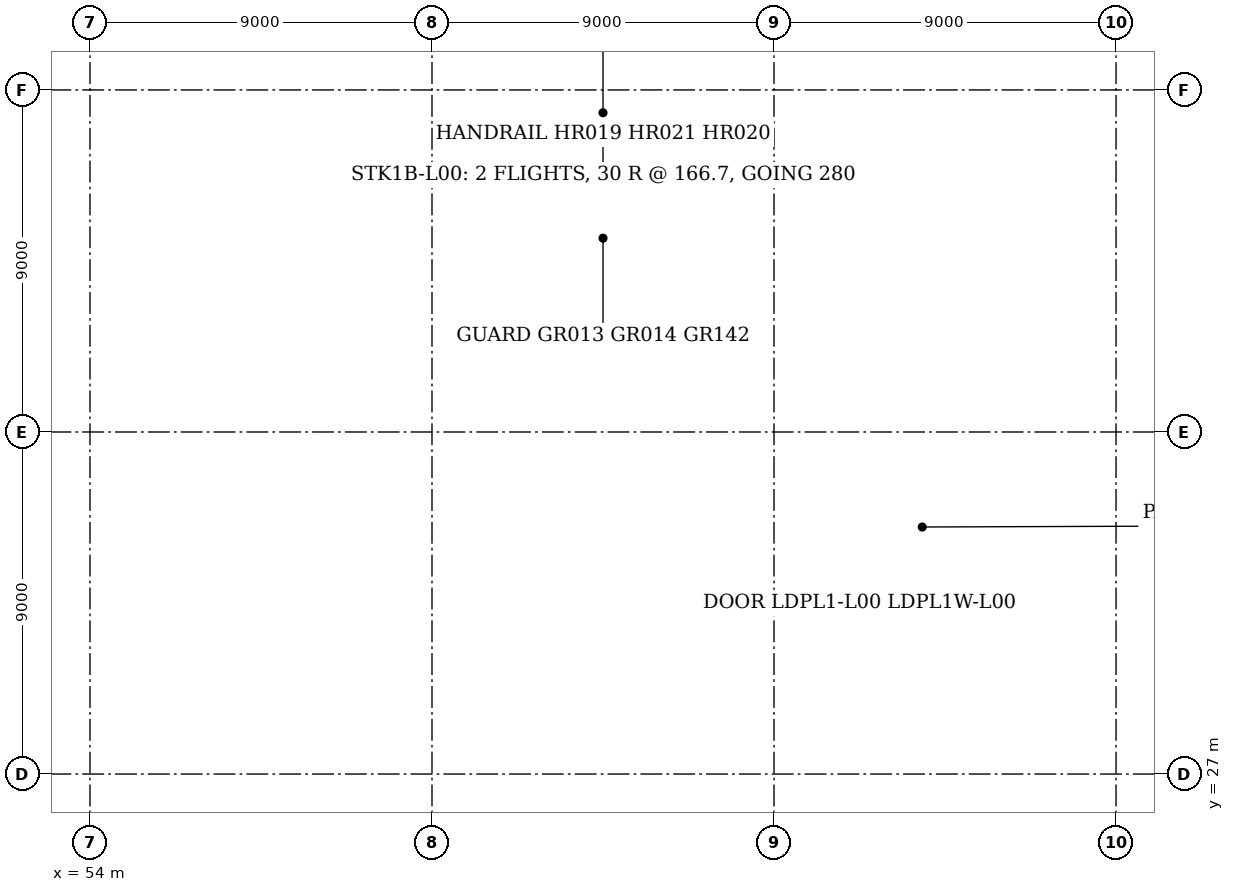
"""IFC4 building model, lengths in metres.
Left out: names, types, materials, properties, quantities, classifications, styles, units other than length and angle.
Written with IfcOpenShell. Run it as: python <this file> out.ifc"""

import sys

from ifc_helpers import new_model, si_unit, direction, frame, frame_2d, origin, origin_2d, place, context, subcontext, project, spatial, rectangle, hollow_circle, i_section, extrude, element, fill, save


model = new_model("IFC4")
c1 = context("Model", 3, precision=1e-05, world=origin(), true_north=direction((0.0, 1.0)))
c2 = subcontext(c1, "Body", "Model", "MODEL_VIEW")
j1 = project(units=[si_unit("LENGTHUNIT", "METRE"), si_unit("PLANEANGLEUNIT", "RADIAN")], contexts=[c1])
p1 = place(None, origin())
s1 = spatial("IfcSite", under=j1, at=p1, CompositionType="ELEMENT")
p2 = place(p1, origin())
s2 = spatial("IfcBuilding", under=s1, at=p2, CompositionType="ELEMENT")
p3 = place(p2, origin())
s3 = spatial("IfcBuildingStorey", under=s2, at=p3, CompositionType="ELEMENT", Elevation=0.0)
p4 = place(p3, frame((54.0, 27.0, 0.0), z_axis=(0.0, 0.0, 1.0), x_axis=(1.0, 0.0, 0.0)))
e1 = element("IfcColumn", 1, at=p4, inside=s3, PredefinedType="COLUMN", context=c2, shape_type="SweptSolid", body=[
    extrude(i_section(OverallWidth=0.5, OverallDepth=0.48, WebThickness=0.04, FlangeThickness=0.04, at=origin_2d()), origin(), (0.0, 0.0, 1.0), 5.0),
])
p5 = place(p3, frame((63.0, 27.0, 0.0), z_axis=(0.0, 0.0, 1.0), x_axis=(1.0, 0.0, 0.0)))
e2 = element("IfcColumn", 2, at=p5, inside=s3, PredefinedType="COLUMN", context=c2, shape_type="SweptSolid", body=[
    extrude(i_section(OverallWidth=0.311, OverallDepth=0.327, WebThickness=0.016, FlangeThickness=0.025, FilletRadius=0.017, at=origin_2d()), origin(), (0.0, 0.0, 1.0), 5.0),
])
p6 = place(p3, frame((81.0, 27.0, 0.0), z_axis=(0.0, 0.0, 1.0), x_axis=(1.0, 0.0, 0.0)))
e3 = element("IfcColumn", 3, at=p6, inside=s3, PredefinedType="COLUMN", context=c2, shape_type="SweptSolid", body=[
    extrude(hollow_circle(Radius=0.203, WallThickness=0.013, at=origin_2d()), origin(), (0.0, 0.0, 1.0), 5.0),
])
p7 = place(p3, frame((54.0, 36.0, 0.0), z_axis=(0.0, 0.0, 1.0), x_axis=(1.0, 0.0, 0.0)))
e4 = element("IfcColumn", 4, at=p7, inside=s3, PredefinedType="COLUMN", context=c2, shape_type="SweptSolid", body=[
    extrude(i_section(OverallWidth=0.5, OverallDepth=0.48, WebThickness=0.04, FlangeThickness=0.04, at=origin_2d()), origin(), (0.0, 0.0, 1.0), 5.0),
])
p8 = place(p3, frame((63.0, 36.0, 0.0), z_axis=(0.0, 0.0, 1.0), x_axis=(1.0, 0.0, 0.0)))
e5 = element("IfcColumn", 5, at=p8, inside=s3, PredefinedType="COLUMN", context=c2, shape_type="SweptSolid", body=[
    extrude(i_section(OverallWidth=0.311, OverallDepth=0.327, WebThickness=0.016, FlangeThickness=0.025, FilletRadius=0.017, at=origin_2d()), origin(), (0.0, 0.0, 1.0), 5.0),
])
p9 = place(p3, frame((81.0, 36.0, 0.0), z_axis=(0.0, 0.0, 1.0), x_axis=(1.0, 0.0, 0.0)))
e6 = element("IfcColumn", 6, at=p9, inside=s3, PredefinedType="COLUMN", context=c2, shape_type="SweptSolid", body=[
    extrude(i_section(OverallWidth=0.35, OverallDepth=0.339, WebThickness=0.025, FlangeThickness=0.032, at=origin_2d()), origin(), (0.0, 0.0, 1.0), 5.0),
])
p10 = place(p3, frame((54.0, 45.0, 0.0), z_axis=(0.0, 0.0, 1.0), x_axis=(1.0, 0.0, 0.0)))
e7 = element("IfcColumn", 7, at=p10, inside=s3, PredefinedType="COLUMN", context=c2, shape_type="SweptSolid", body=[
    extrude(i_section(OverallWidth=0.5, OverallDepth=0.48, WebThickness=0.04, FlangeThickness=0.04, at=origin_2d()), origin(), (0.0, 0.0, 1.0), 5.0),
])
p11 = place(p3, frame((54.25, 44.91, 0.0), z_axis=(0.0, 0.0, 1.0), x_axis=(1.0, 0.0, 0.0)))
e8 = element("IfcWall", 8, at=p11, inside=s3, PredefinedType="SOLIDWALL", context=c2, shape_type="SweptSolid", body=[
    extrude(rectangle(XDim=8.75, YDim=0.3, at=frame_2d((4.375, 0.0))), origin(), (0.0, 0.0, 1.0), 4.378),
])
p12 = place(p3, frame((63.125, 45.2, -0.7), z_axis=(0.0, 0.0, 1.0), x_axis=(0.0, 1.0, 0.0)))
e9 = element("IfcWall", 9, at=p12, inside=s3, PredefinedType="SOLIDWALL", context=c2, shape_type="SweptSolid", body=[
    extrude(rectangle(XDim=5.55, YDim=0.25, at=frame_2d((2.775, 0.0))), origin(), (0.0, 0.0, 1.0), 0.7),
])
p13 = place(p3, frame((63.0, 40.65, 0.0), z_axis=(0.0, 0.0, 1.0), x_axis=(1.0, 0.0, 0.0)))
e10 = element("IfcWall", 10, at=p13, inside=s3, PredefinedType="SOLIDWALL", context=c2, shape_type="SweptSolid", body=[
    extrude(rectangle(XDim=9.0, YDim=0.3, at=frame_2d((4.5, 0.0))), origin(), (0.0, 0.0, 1.0), 5.0),
])
p14 = place(p13, frame((0.55, 0.0, 0.0)))
e11 = element("IfcOpeningElement", 11, at=p14, cuts=e10, PredefinedType="OPENING", context=c2, shape_type="SweptSolid", body=[
    extrude(rectangle(XDim=1.2, YDim=2.1, at=frame_2d((0.6, 1.05))), frame((0.0, 0.16, 0.0), z_axis=(0.0, -1.0, 0.0), x_axis=(1.0, 0.0, 0.0)), (0.0, 0.0, 1.0), 0.32),
])
p15 = place(p3, frame((71.85, 40.8, 0.0), z_axis=(0.0, 0.0, 1.0), x_axis=(0.0, 1.0, 0.0)))
e12 = element("IfcWall", 12, at=p15, inside=s3, PredefinedType="SOLIDWALL", context=c2, shape_type="SweptSolid", body=[
    extrude(rectangle(XDim=3.9, YDim=0.3, at=frame_2d((1.95, 0.0))), origin(), (0.0, 0.0, 1.0), 5.0),
])
p16 = place(p3, frame((63.0, 44.85, 0.0), z_axis=(0.0, 0.0, 1.0), x_axis=(1.0, 0.0, 0.0)))
e13 = element("IfcWall", 13, at=p16, inside=s3, PredefinedType="SOLIDWALL", context=c2, shape_type="SweptSolid", body=[
    extrude(rectangle(XDim=9.0, YDim=0.3, at=frame_2d((4.5, 0.0))), origin(), (0.0, 0.0, 1.0), 5.0),
])
p17 = place(p16, frame((3.65, 0.0, 0.0)))
e14 = element("IfcOpeningElement", 14, at=p17, cuts=e13, PredefinedType="OPENING", context=c2, shape_type="SweptSolid", body=[
    extrude(rectangle(XDim=1.8, YDim=2.1, at=frame_2d((0.9, 1.05))), frame((0.0, 0.16, 0.0), z_axis=(0.0, -1.0, 0.0), x_axis=(1.0, 0.0, 0.0)), (0.0, 0.0, 1.0), 0.32),
])
p18 = place(p3, frame((63.15, 40.8, 0.0), z_axis=(0.0, 0.0, 1.0), x_axis=(0.0, 1.0, 0.0)))
e15 = element("IfcWall", 15, at=p18, inside=s3, PredefinedType="SOLIDWALL", context=c2, shape_type="SweptSolid", body=[
    extrude(rectangle(XDim=3.9, YDim=0.3, at=frame_2d((1.95, 0.0))), origin(), (0.0, 0.0, 1.0), 5.0),
])
p19 = place(p3, frame((72.0, 45.15, 0.0), z_axis=(0.0, 0.0, 1.0), x_axis=(1.0, 0.0, 0.0)))
e16 = element("IfcWall", 16, at=p19, inside=s3, PredefinedType="SOLIDWALL", context=c2, shape_type="SweptSolid", body=[
    extrude(rectangle(XDim=9.0, YDim=0.3, at=frame_2d((4.5, 0.0))), origin(), (0.0, 0.0, 1.0), 5.0),
])
p20 = place(p3, frame((80.85, 45.3, 0.0), z_axis=(0.0, 0.0, 1.0), x_axis=(0.0, 1.0, 0.0)))
e17 = element("IfcWall", 17, at=p20, inside=s3, PredefinedType="SOLIDWALL", context=c2, shape_type="SweptSolid", body=[
    extrude(rectangle(XDim=8.4, YDim=0.3, at=frame_2d((4.2, 0.0))), origin(), (0.0, 0.0, 1.0), 5.0),
])
p21 = place(p20, frame((3.0, 0.0, 0.0)))
e18 = element("IfcOpeningElement", 18, at=p21, cuts=e17, PredefinedType="OPENING", context=c2, shape_type="SweptSolid", body=[
    extrude(rectangle(XDim=2.4, YDim=2.4, at=frame_2d((1.2, 1.2))), frame((0.0, 0.16, 0.0), z_axis=(0.0, -1.0, 0.0), x_axis=(1.0, 0.0, 0.0)), (0.0, 0.0, 1.0), 0.32),
])
p22 = place(p3, frame((72.15, 45.3, 0.0), z_axis=(0.0, 0.0, 1.0), x_axis=(0.0, 1.0, 0.0)))
e19 = element("IfcWall", 19, at=p22, inside=s3, PredefinedType="SOLIDWALL", context=c2, shape_type="SweptSolid", body=[
    extrude(rectangle(XDim=8.4, YDim=0.3, at=frame_2d((4.2, 0.0))), origin(), (0.0, 0.0, 1.0), 5.0),
])
p23 = place(p3, frame((72.0, 27.15, 0.0), z_axis=(0.0, 0.0, 1.0), x_axis=(1.0, 0.0, 0.0)))
e20 = element("IfcWall", 20, at=p23, inside=s3, PredefinedType="SOLIDWALL", context=c2, shape_type="SweptSolid", body=[
    extrude(rectangle(XDim=4.5, YDim=0.3, at=frame_2d((2.25, 0.0))), origin(), (0.0, 0.0, 1.0), 5.0),
])
p24 = place(p3, frame((76.35, 27.3, 0.0), z_axis=(0.0, 0.0, 1.0), x_axis=(0.0, 1.0, 0.0)))
e21 = element("IfcWall", 21, at=p24, inside=s3, PredefinedType="SOLIDWALL", context=c2, shape_type="SweptSolid", body=[
    extrude(rectangle(XDim=8.4, YDim=0.3, at=frame_2d((4.2, 0.0))), origin(), (0.0, 0.0, 1.0), 5.0),
])
p25 = place(p24, frame((0.45, 0.0, 0.0)))
e22 = element("IfcOpeningElement", 22, at=p25, cuts=e21, PredefinedType="OPENING", context=c2, shape_type="SweptSolid", body=[
    extrude(rectangle(XDim=1.4, YDim=2.1, at=frame_2d((0.7, 1.05))), frame((0.0, 0.16, 0.0), z_axis=(0.0, -1.0, 0.0), x_axis=(1.0, 0.0, 0.0)), (0.0, 0.0, 1.0), 0.32),
])
p26 = place(p24, frame((4.925, 0.0, 0.0)))
e23 = element("IfcOpeningElement", 23, at=p26, cuts=e21, PredefinedType="OPENING", context=c2, shape_type="SweptSolid", body=[
    extrude(rectangle(XDim=1.0, YDim=2.1, at=frame_2d((0.5, 1.05))), frame((0.0, 0.16, 0.0), z_axis=(0.0, -1.0, 0.0), x_axis=(1.0, 0.0, 0.0)), (0.0, 0.0, 1.0), 0.32),
])
p27 = place(p3, frame((72.0, 35.85, 0.0), z_axis=(0.0, 0.0, 1.0), x_axis=(1.0, 0.0, 0.0)))
e24 = element("IfcWall", 24, at=p27, inside=s3, PredefinedType="SOLIDWALL", context=c2, shape_type="SweptSolid", body=[
    extrude(rectangle(XDim=4.5, YDim=0.3, at=frame_2d((2.25, 0.0))), origin(), (0.0, 0.0, 1.0), 5.0),
])
p28 = place(p3, frame((72.15, 27.3, 0.0), z_axis=(0.0, 0.0, 1.0), x_axis=(0.0, 1.0, 0.0)))
e25 = element("IfcWall", 25, at=p28, inside=s3, PredefinedType="SOLIDWALL", context=c2, shape_type="SweptSolid", body=[
    extrude(rectangle(XDim=8.4, YDim=0.3, at=frame_2d((4.2, 0.0))), origin(), (0.0, 0.0, 1.0), 5.0),
])
p29 = place(p28, frame((0.45, 0.0, 0.0)))
e26 = element("IfcOpeningElement", 26, at=p29, cuts=e25, PredefinedType="OPENING", context=c2, shape_type="SweptSolid", body=[
    extrude(rectangle(XDim=1.4, YDim=2.1, at=frame_2d((0.7, 1.05))), frame((0.0, 0.16, 0.0), z_axis=(0.0, -1.0, 0.0), x_axis=(1.0, 0.0, 0.0)), (0.0, 0.0, 1.0), 0.32),
])
p30 = place(p3, frame((72.15, 29.675, 0.0), z_axis=(0.0, 0.0, 1.0), x_axis=(1.0, 0.0, 0.0)))
e27 = element("IfcWall", 27, at=p30, inside=s3, PredefinedType="SOLIDWALL", context=c2, shape_type="SweptSolid", body=[
    extrude(rectangle(XDim=4.2, YDim=0.15, at=frame_2d((2.1, 0.0))), origin(), (0.0, 0.0, 1.0), 5.0),
])
p31 = place(p3, frame((57.047, 27.1, 0.0), z_axis=(0.0, 0.0, 1.0), x_axis=(1.0, 0.0, 0.0)))
e28 = element("IfcWall", 28, at=p31, inside=s3, PredefinedType="PARTITIONING", context=c2, shape_type="SweptSolid", body=[
    extrude(rectangle(XDim=3.0, YDim=0.2, at=frame_2d((1.5, 0.0))), origin(), (0.0, 0.0, 1.0), 4.228),
])
p32 = place(p3, frame((62.9, 30.0, 0.0), z_axis=(0.0, 0.0, 1.0), x_axis=(0.0, 1.0, 0.0)))
e29 = element("IfcWall", 29, at=p32, inside=s3, PredefinedType="PARTITIONING", context=c2, shape_type="SweptSolid", body=[
    extrude(rectangle(XDim=3.0, YDim=0.2, at=frame_2d((1.5, 0.0))), origin(), (0.0, 0.0, 1.0), 4.228),
])
p33 = place(p32, frame((0.55, 0.0, 0.0)))
e30 = element("IfcOpeningElement", 30, at=p33, cuts=e29, PredefinedType="OPENING", context=c2, shape_type="SweptSolid", body=[
    extrude(rectangle(XDim=1.8, YDim=2.1, at=frame_2d((0.9, 1.05))), frame((0.0, 0.11, 0.0), z_axis=(0.0, -1.0, 0.0), x_axis=(1.0, 0.0, 0.0)), (0.0, 0.0, 1.0), 0.22),
])
p34 = place(p3, frame((54.25, 35.9, 0.0), z_axis=(0.0, 0.0, 1.0), x_axis=(1.0, 0.0, 0.0)))
e31 = element("IfcWall", 31, at=p34, inside=s3, PredefinedType="PARTITIONING", context=c2, shape_type="SweptSolid", body=[
    extrude(rectangle(XDim=8.594, YDim=0.2, at=frame_2d((4.297, 0.0))), origin(), (0.0, 0.0, 1.0), 4.228),
])
p35 = place(p3, frame((63.0, 36.164, 0.0), z_axis=(0.0, 0.0, 1.0), x_axis=(0.0, 1.0, 0.0)))
e32 = element("IfcWall", 32, at=p35, inside=s3, PredefinedType="PARTITIONING", context=c2, shape_type="SweptSolid", body=[
    extrude(rectangle(XDim=4.336, YDim=0.2, at=frame_2d((2.168, 0.0))), origin(), (0.0, 0.0, 1.0), 4.302),
])
p36 = place(p3, frame((72.0, 36.0, 0.0), z_axis=(0.0, 0.0, 1.0), x_axis=(0.0, 1.0, 0.0)))
e33 = element("IfcWall", 33, at=p36, inside=s3, PredefinedType="PARTITIONING", context=c2, shape_type="SweptSolid", body=[
    extrude(rectangle(XDim=3.0, YDim=0.15, at=frame_2d((1.5, 0.0))), origin(), (0.0, 0.0, 1.0), 3.958),
])
p37 = place(p3, frame((72.0, 39.0, 0.0), z_axis=(0.0, 0.0, 1.0), x_axis=(0.0, 1.0, 0.0)))
e34 = element("IfcWall", 34, at=p37, inside=s3, PredefinedType="PARTITIONING", context=c2, shape_type="SweptSolid", body=[
    extrude(rectangle(XDim=1.5, YDim=0.2, at=frame_2d((0.75, 0.0))), origin(), (0.0, 0.0, 1.0), 3.958),
])
p38 = place(p3, frame((54.0, 36.24, 0.0), z_axis=(0.0, 0.0, 1.0), x_axis=(0.0, 1.0, 0.0)))
e35 = element("IfcWall", 35, at=p38, inside=s3, PredefinedType="PARTITIONING", context=c2, shape_type="SweptSolid", body=[
    extrude(rectangle(XDim=8.52, YDim=0.2, at=frame_2d((4.26, 0.0))), origin(), (0.0, 0.0, 1.0), 4.302),
])
p39 = place(p38, frame((3.35, 0.0, 0.0)))
e36 = element("IfcOpeningElement", 36, at=p39, cuts=e35, PredefinedType="OPENING", context=c2, shape_type="SweptSolid", body=[
    extrude(rectangle(XDim=1.8, YDim=2.1, at=frame_2d((0.9, 1.05))), frame((0.0, 0.11, 0.0), z_axis=(0.0, -1.0, 0.0), x_axis=(1.0, 0.0, 0.0)), (0.0, 0.0, 1.0), 0.22),
])
p40 = place(p3, frame((81.203, 27.0, 0.0), z_axis=(0.0, 0.0, 1.0), x_axis=(1.0, 0.0, 0.0)))
e37 = element("IfcWall", 37, at=p40, inside=s3, PredefinedType="PARTITIONING", context=c2, shape_type="SweptSolid", body=[
    extrude(rectangle(XDim=8.594, YDim=0.125, at=frame_2d((4.297, 0.0))), origin(), (0.0, 0.0, 1.0), 4.228),
])
p41 = place(p40, frame((3.75, 0.0, 0.0)))
e38 = element("IfcOpeningElement", 38, at=p41, cuts=e37, PredefinedType="OPENING", context=c2, shape_type="SweptSolid", body=[
    extrude(rectangle(XDim=1.0, YDim=2.1, at=frame_2d((0.5, 1.05))), frame((0.0, 0.073, 0.0), z_axis=(0.0, -1.0, 0.0), x_axis=(1.0, 0.0, 0.0)), (0.0, 0.0, 1.0), 0.145),
])
p42 = place(p3, frame((76.5, 36.0, 0.0), z_axis=(0.0, 0.0, 1.0), x_axis=(1.0, 0.0, 0.0)))
e39 = element("IfcWall", 39, at=p42, inside=s3, PredefinedType="PARTITIONING", context=c2, shape_type="SweptSolid", body=[
    extrude(rectangle(XDim=4.325, YDim=0.15, at=frame_2d((2.163, 0.0))), origin(), (0.0, 0.0, 1.0), 3.958),
])
p43 = place(p42, frame((1.655, 0.0, 0.0)))
e40 = element("IfcOpeningElement", 40, at=p43, cuts=e39, PredefinedType="OPENING", context=c2, shape_type="SweptSolid", body=[
    extrude(rectangle(XDim=1.0, YDim=2.1, at=frame_2d((0.5, 1.05))), frame((0.0, 0.085, 0.0), z_axis=(0.0, -1.0, 0.0), x_axis=(1.0, 0.0, 0.0)), (0.0, 0.0, 1.0), 0.17),
])
p44 = place(p3, frame((81.0, 27.203, 0.0), z_axis=(0.0, 0.0, 1.0), x_axis=(0.0, 1.0, 0.0)))
e41 = element("IfcWall", 41, at=p44, inside=s3, PredefinedType="PARTITIONING", context=c2, shape_type="SweptSolid", body=[
    extrude(rectangle(XDim=1.597, YDim=0.125, at=frame_2d((0.798, 0.0))), origin(), (0.0, 0.0, 1.0), 4.302),
])
p45 = place(p3, frame((81.0, 28.8, 0.0), z_axis=(0.0, 0.0, 1.0), x_axis=(0.0, 1.0, 0.0)))
e42 = element("IfcWall", 42, at=p45, inside=s3, PredefinedType="PARTITIONING", context=c2, shape_type="SweptSolid", body=[
    extrude(rectangle(XDim=7.031, YDim=0.075, at=frame_2d((3.515, 0.0))), origin(), (0.0, 0.0, 1.0), 4.302),
])
p46 = place(p3, frame((72.0, 39.0, 0.0), z_axis=(0.0, 0.0, 1.0), x_axis=(1.0, 0.0, 0.0)))
e43 = element("IfcWall", 43, at=p46, inside=s3, PredefinedType="PARTITIONING", context=c2, shape_type="SweptSolid", body=[
    extrude(rectangle(XDim=18.0, YDim=0.15, at=frame_2d((9.0, 0.0))), origin(), (0.0, 0.0, 1.0), 3.958),
])
p47 = place(p46, frame((8.51, 0.0, 0.0)))
e44 = element("IfcOpeningElement", 44, at=p47, cuts=e43, PredefinedType="OPENING", context=c2, shape_type="SweptSolid", body=[
    extrude(rectangle(XDim=1.0, YDim=2.1, at=frame_2d((0.5, 1.05))), frame((0.0, 0.085, 0.0), z_axis=(0.0, -1.0, 0.0), x_axis=(1.0, 0.0, 0.0)), (0.0, 0.0, 1.0), 0.17),
])
p48 = place(p3, frame((81.175, 36.0, 0.0), z_axis=(0.0, 0.0, 1.0), x_axis=(1.0, 0.0, 0.0)))
e45 = element("IfcWall", 45, at=p48, inside=s3, PredefinedType="PARTITIONING", context=c2, shape_type="SweptSolid", body=[
    extrude(rectangle(XDim=2.825, YDim=0.15, at=frame_2d((1.413, 0.0))), origin(), (0.0, 0.0, 1.0), 3.958),
])
p49 = place(p3, frame((81.0, 45.0, 0.0), z_axis=(0.0, 0.0, 1.0), x_axis=(1.0, 0.0, 0.0)))
e46 = element("IfcWall", 46, at=p49, inside=s3, PredefinedType="PARTITIONING", context=c2, shape_type="SweptSolid", body=[
    extrude(rectangle(XDim=8.845, YDim=0.2, at=frame_2d((4.423, 0.0))), origin(), (0.0, 0.0, 1.0), 3.958),
])
p50 = place(p3, frame((81.0, 28.8, 0.0), z_axis=(0.0, 0.0, 1.0), x_axis=(1.0, 0.0, 0.0)))
e47 = element("IfcWall", 47, at=p50, inside=s3, PredefinedType="PARTITIONING", context=c2, shape_type="SweptSolid", body=[
    extrude(rectangle(XDim=3.0, YDim=0.075, at=frame_2d((1.5, 0.0))), origin(), (0.0, 0.0, 1.0), 4.302),
])
p51 = place(p50, frame((1.073, 0.0, 0.0)))
e48 = element("IfcOpeningElement", 48, at=p51, cuts=e47, PredefinedType="OPENING", context=c2, shape_type="SweptSolid", body=[
    extrude(rectangle(XDim=0.9, YDim=2.1, at=frame_2d((0.45, 1.05))), frame((0.0, 0.047, 0.0), z_axis=(0.0, -1.0, 0.0), x_axis=(1.0, 0.0, 0.0)), (0.0, 0.0, 1.0), 0.095),
])
p52 = place(p17, origin())
e49 = element("IfcDoor", 49, at=p52, inside=s3, OperationType="DOUBLE_DOOR_SINGLE_SWING", PredefinedType="DOOR", context=c2, shape_type="SweptSolid", body=[
    extrude(rectangle(XDim=1.8, YDim=2.1, at=frame_2d((0.9, 1.05))), frame((0.0, 0.025, 0.0), z_axis=(0.0, -1.0, 0.0), x_axis=(1.0, 0.0, 0.0)), (0.0, 0.0, 1.0), 0.05),
])
fill(e14, e49)
p53 = place(p14, origin())
e50 = element("IfcDoor", 50, at=p53, inside=s3, OperationType="SINGLE_SWING_RIGHT", PredefinedType="DOOR", context=c2, shape_type="SweptSolid", body=[
    extrude(rectangle(XDim=1.2, YDim=2.1, at=frame_2d((0.6, 1.05))), frame((0.0, 0.025, 0.0), z_axis=(0.0, -1.0, 0.0), x_axis=(1.0, 0.0, 0.0)), (0.0, 0.0, 1.0), 0.05),
])
fill(e11, e50)
p54 = place(p25, origin())
e51 = element("IfcDoor", 51, at=p54, inside=s3, OperationType="SLIDING_TO_LEFT", PredefinedType="DOOR", context=c2, shape_type="SweptSolid", body=[
    extrude(rectangle(XDim=1.4, YDim=2.1, at=frame_2d((0.7, 1.05))), frame((0.0, 0.025, 0.0), z_axis=(0.0, -1.0, 0.0), x_axis=(1.0, 0.0, 0.0)), (0.0, 0.0, 1.0), 0.05),
])
fill(e22, e51)
p55 = place(p29, origin())
e52 = element("IfcDoor", 52, at=p55, inside=s3, OperationType="SLIDING_TO_RIGHT", PredefinedType="DOOR", context=c2, shape_type="SweptSolid", body=[
    extrude(rectangle(XDim=1.4, YDim=2.1, at=frame_2d((0.7, 1.05))), frame((0.0, 0.025, 0.0), z_axis=(0.0, -1.0, 0.0), x_axis=(1.0, 0.0, 0.0)), (0.0, 0.0, 1.0), 0.05),
])
fill(e26, e52)
p56 = place(p26, frame((1.0, 0.0, 0.0), z_axis=(0.0, 0.0, 1.0), x_axis=(-1.0, 0.0, 0.0)))
e53 = element("IfcDoor", 53, at=p56, inside=s3, OperationType="SINGLE_SWING_RIGHT", PredefinedType="DOOR", context=c2, shape_type="SweptSolid", body=[
    extrude(rectangle(XDim=1.0, YDim=2.1, at=frame_2d((0.5, 1.05))), frame((0.0, 0.025, 0.0), z_axis=(0.0, -1.0, 0.0), x_axis=(1.0, 0.0, 0.0)), (0.0, 0.0, 1.0), 0.05),
])
fill(e23, e53)
p57 = place(p33, origin())
e54 = element("IfcDoor", 54, at=p57, inside=s3, OperationType="DOUBLE_DOOR_SINGLE_SWING", PredefinedType="DOOR", context=c2, shape_type="SweptSolid", body=[
    extrude(rectangle(XDim=1.8, YDim=2.1, at=frame_2d((0.9, 1.05))), frame((0.0, 0.025, 0.0), z_axis=(0.0, -1.0, 0.0), x_axis=(1.0, 0.0, 0.0)), (0.0, 0.0, 1.0), 0.05),
])
fill(e30, e54)
p58 = place(p43, origin())
e55 = element("IfcDoor", 55, at=p58, inside=s3, OperationType="SINGLE_SWING_RIGHT", PredefinedType="DOOR", context=c2, shape_type="SweptSolid", body=[
    extrude(rectangle(XDim=1.0, YDim=2.1, at=frame_2d((0.5, 1.05))), frame((0.0, 0.025, 0.0), z_axis=(0.0, -1.0, 0.0), x_axis=(1.0, 0.0, 0.0)), (0.0, 0.0, 1.0), 0.05),
])
fill(e40, e55)
p59 = place(p39, frame((1.8, 0.0, 0.0), z_axis=(0.0, 0.0, 1.0), x_axis=(-1.0, 0.0, 0.0)))
e56 = element("IfcDoor", 56, at=p59, inside=s3, OperationType="DOUBLE_DOOR_SINGLE_SWING", PredefinedType="DOOR", context=c2, shape_type="SweptSolid", body=[
    extrude(rectangle(XDim=1.8, YDim=2.1, at=frame_2d((0.9, 1.05))), frame((0.0, 0.025, 0.0), z_axis=(0.0, -1.0, 0.0), x_axis=(1.0, 0.0, 0.0)), (0.0, 0.0, 1.0), 0.05),
])
fill(e36, e56)
p60 = place(p47, origin())
e57 = element("IfcDoor", 57, at=p60, inside=s3, OperationType="SINGLE_SWING_RIGHT", PredefinedType="DOOR", context=c2, shape_type="SweptSolid", body=[
    extrude(rectangle(XDim=1.0, YDim=2.1, at=frame_2d((0.5, 1.05))), frame((0.0, 0.025, 0.0), z_axis=(0.0, -1.0, 0.0), x_axis=(1.0, 0.0, 0.0)), (0.0, 0.0, 1.0), 0.05),
])
fill(e44, e57)
save(model, sys.argv[1])
